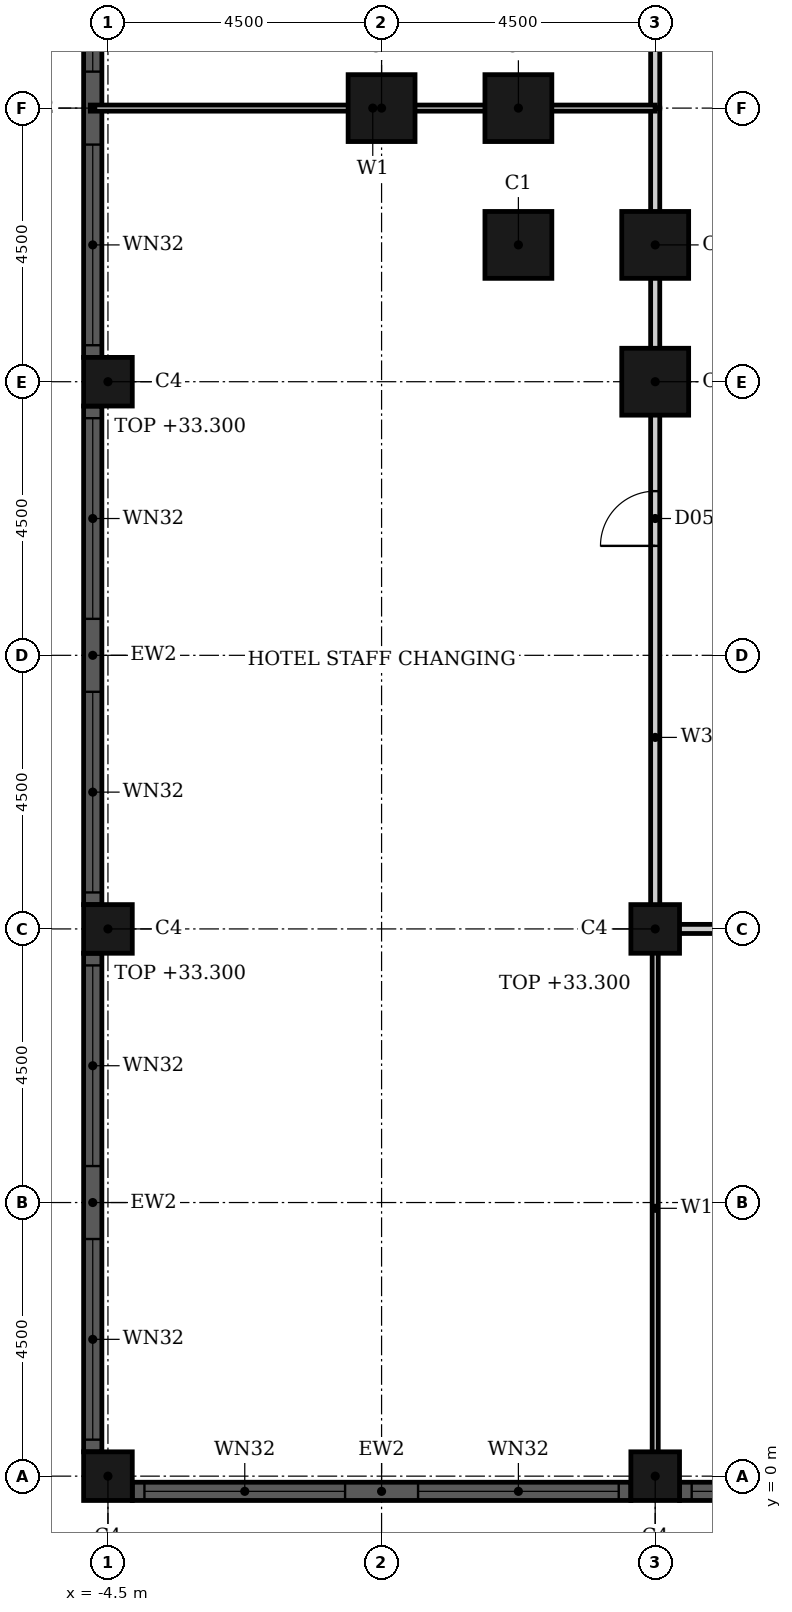
"""IFC4 building model, lengths in metres.
Left out: names, types, materials, properties, quantities, classifications, styles, units other than length and angle.
Written with IfcOpenShell. Run it as: python <this file> out.ifc"""

import sys

from ifc_helpers import new_model, si_unit, direction, frame, frame_2d, origin, origin_2d, place, context, subcontext, project, spatial, rectangle, hollow_rectangle, extrude, element, fill, save


model = new_model("IFC4")
c1 = context("Model", 3, precision=1e-05, world=origin(), true_north=direction((0.0, 1.0)))
c2 = subcontext(c1, "Body", "Model", "MODEL_VIEW")
j1 = project(units=[si_unit("LENGTHUNIT", "METRE"), si_unit("PLANEANGLEUNIT", "RADIAN")], contexts=[c1])
p1 = place(None, origin())
s1 = spatial("IfcSite", under=j1, at=p1, CompositionType="ELEMENT")
p2 = place(p1, origin())
s2 = spatial("IfcBuilding", under=s1, at=p2, CompositionType="ELEMENT")
p3 = place(p2, frame((0.0, 0.0, 28.8)))
s3 = spatial("IfcBuildingStorey", under=s2, at=p3, CompositionType="ELEMENT", Elevation=28.8)
for number, where, z_axis, x_axis in (
    (1, (0.0, 22.5, 0.0), (0.0, 0.0, 1.0), (1.0, 0.0, 0.0)),
    (2, (2.25, 22.5, 0.0), (0.0, 0.0, 1.0), (1.0, 0.0, 0.0)),
    (3, (2.25, 20.25, 0.0), (0.0, 0.0, 1.0), (1.0, 0.0, 0.0)),
    (4, (4.5, 20.25, 0.0), (0.0, 0.0, 1.0), (1.0, 0.0, 0.0)),
    (5, (4.5, 18.0, 0.0), (0.0, 0.0, 1.0), (1.0, 0.0, 0.0)),
):
    element("IfcColumn", number, at=place(p3, frame(where, z_axis=z_axis, x_axis=x_axis)), inside=s3, PredefinedType="COLUMN", context=c2, shape_type="SweptSolid", body=[
        extrude(hollow_rectangle(XDim=1.1, YDim=1.1, WallThickness=0.036, at=origin_2d()), origin(), (0.0, 0.0, 1.0), 4.8),
    ])
for number, where, z_axis, x_axis in (
    (6, (-4.5, 0.0, 0.0), (0.0, 0.0, 1.0), (1.0, 0.0, 0.0)),
    (7, (-4.5, 9.0, 0.0), (0.0, 0.0, 1.0), (1.0, 0.0, 0.0)),
    (8, (-4.5, 18.0, 0.0), (0.0, 0.0, 1.0), (1.0, 0.0, 0.0)),
    (9, (4.5, 0.0, 0.0), (0.0, 0.0, 1.0), (1.0, 0.0, 0.0)),
    (10, (4.5, 9.0, 0.0), (0.0, 0.0, 1.0), (1.0, 0.0, 0.0)),
):
    element("IfcColumn", number, at=place(p3, frame(where, z_axis=z_axis, x_axis=x_axis)), inside=s3, PredefinedType="COLUMN", context=c2, shape_type="SweptSolid", body=[
        extrude(hollow_rectangle(XDim=0.8, YDim=0.8, WallThickness=0.025, at=origin_2d()), origin(), (0.0, 0.0, 1.0), 4.5),
    ])
p4 = place(p3, frame((-4.75, 26.6, 0.0), z_axis=(0.0, 0.0, 1.0), x_axis=(0.0, -1.0, 0.0)))
e11 = element("IfcWall", 11, at=p4, inside=s3, PredefinedType="SOLIDWALL", context=c2, shape_type="SweptSolid", body=[
    extrude(rectangle(XDim=8.2, YDim=0.3, at=frame_2d((4.1, 0.0))), origin(), (0.0, 0.0, 1.0), 4.8),
])
p5 = place(p4, frame((0.2, 0.0, 0.9)))
e12 = element("IfcOpeningElement", 12, at=p5, cuts=e11, PredefinedType="OPENING", context=c2, shape_type="SweptSolid", body=[
    extrude(rectangle(XDim=3.3, YDim=2.9, at=frame_2d((1.65, 1.45))), frame((0.0, 0.16, 0.0), z_axis=(0.0, -1.0, 0.0), x_axis=(1.0, 0.0, 0.0)), (0.0, 0.0, 1.0), 0.32),
])
p6 = place(p4, frame((4.7, 0.0, 0.9)))
e13 = element("IfcOpeningElement", 13, at=p6, cuts=e11, PredefinedType="OPENING", context=c2, shape_type="SweptSolid", body=[
    extrude(rectangle(XDim=3.3, YDim=2.9, at=frame_2d((1.65, 1.45))), frame((0.0, 0.16, 0.0), z_axis=(0.0, -1.0, 0.0), x_axis=(1.0, 0.0, 0.0)), (0.0, 0.0, 1.0), 0.32),
])
p7 = place(p3, frame((-4.75, 17.6, 0.0), z_axis=(0.0, 0.0, 1.0), x_axis=(0.0, -1.0, 0.0)))
e14 = element("IfcWall", 14, at=p7, inside=s3, PredefinedType="SOLIDWALL", context=c2, shape_type="SweptSolid", body=[
    extrude(rectangle(XDim=8.2, YDim=0.3, at=frame_2d((4.1, 0.0))), origin(), (0.0, 0.0, 1.0), 4.8),
])
p8 = place(p7, frame((0.2, 0.0, 0.9)))
e15 = element("IfcOpeningElement", 15, at=p8, cuts=e14, PredefinedType="OPENING", context=c2, shape_type="SweptSolid", body=[
    extrude(rectangle(XDim=3.3, YDim=2.9, at=frame_2d((1.65, 1.45))), frame((0.0, 0.16, 0.0), z_axis=(0.0, -1.0, 0.0), x_axis=(1.0, 0.0, 0.0)), (0.0, 0.0, 1.0), 0.32),
])
p9 = place(p7, frame((4.7, 0.0, 0.9)))
e16 = element("IfcOpeningElement", 16, at=p9, cuts=e14, PredefinedType="OPENING", context=c2, shape_type="SweptSolid", body=[
    extrude(rectangle(XDim=3.3, YDim=2.9, at=frame_2d((1.65, 1.45))), frame((0.0, 0.16, 0.0), z_axis=(0.0, -1.0, 0.0), x_axis=(1.0, 0.0, 0.0)), (0.0, 0.0, 1.0), 0.32),
])
p10 = place(p3, frame((-4.75, 8.6, 0.0), z_axis=(0.0, 0.0, 1.0), x_axis=(0.0, -1.0, 0.0)))
e17 = element("IfcWall", 17, at=p10, inside=s3, PredefinedType="SOLIDWALL", context=c2, shape_type="SweptSolid", body=[
    extrude(rectangle(XDim=8.2, YDim=0.3, at=frame_2d((4.1, 0.0))), origin(), (0.0, 0.0, 1.0), 4.8),
])
p11 = place(p10, frame((0.2, 0.0, 0.9)))
e18 = element("IfcOpeningElement", 18, at=p11, cuts=e17, PredefinedType="OPENING", context=c2, shape_type="SweptSolid", body=[
    extrude(rectangle(XDim=3.3, YDim=2.9, at=frame_2d((1.65, 1.45))), frame((0.0, 0.16, 0.0), z_axis=(0.0, -1.0, 0.0), x_axis=(1.0, 0.0, 0.0)), (0.0, 0.0, 1.0), 0.32),
])
p12 = place(p10, frame((4.7, 0.0, 0.9)))
e19 = element("IfcOpeningElement", 19, at=p12, cuts=e17, PredefinedType="OPENING", context=c2, shape_type="SweptSolid", body=[
    extrude(rectangle(XDim=3.3, YDim=2.9, at=frame_2d((1.65, 1.45))), frame((0.0, 0.16, 0.0), z_axis=(0.0, -1.0, 0.0), x_axis=(1.0, 0.0, 0.0)), (0.0, 0.0, 1.0), 0.32),
])
p13 = place(p3, frame((-4.1, -0.25, 0.0), z_axis=(0.0, 0.0, 1.0), x_axis=(1.0, 0.0, 0.0)))
e20 = element("IfcWall", 20, at=p13, inside=s3, PredefinedType="SOLIDWALL", context=c2, shape_type="SweptSolid", body=[
    extrude(rectangle(XDim=8.2, YDim=0.3, at=frame_2d((4.1, 0.0))), origin(), (0.0, 0.0, 1.0), 4.8),
])
p14 = place(p13, frame((0.2, 0.0, 0.9)))
e21 = element("IfcOpeningElement", 21, at=p14, cuts=e20, PredefinedType="OPENING", context=c2, shape_type="SweptSolid", body=[
    extrude(rectangle(XDim=3.3, YDim=2.9, at=frame_2d((1.65, 1.45))), frame((0.0, 0.16, 0.0), z_axis=(0.0, -1.0, 0.0), x_axis=(1.0, 0.0, 0.0)), (0.0, 0.0, 1.0), 0.32),
])
p15 = place(p13, frame((4.7, 0.0, 0.9)))
e22 = element("IfcOpeningElement", 22, at=p15, cuts=e20, PredefinedType="OPENING", context=c2, shape_type="SweptSolid", body=[
    extrude(rectangle(XDim=3.3, YDim=2.9, at=frame_2d((1.65, 1.45))), frame((0.0, 0.16, 0.0), z_axis=(0.0, -1.0, 0.0), x_axis=(1.0, 0.0, 0.0)), (0.0, 0.0, 1.0), 0.32),
])
p16 = place(p3, frame((4.9, -0.25, 0.0), z_axis=(0.0, 0.0, 1.0), x_axis=(1.0, 0.0, 0.0)))
e23 = element("IfcWall", 23, at=p16, inside=s3, PredefinedType="SOLIDWALL", context=c2, shape_type="SweptSolid", body=[
    extrude(rectangle(XDim=8.2, YDim=0.3, at=frame_2d((4.1, 0.0))), origin(), (0.0, 0.0, 1.0), 4.8),
])
p17 = place(p16, frame((0.2, 0.0, 0.9)))
e24 = element("IfcOpeningElement", 24, at=p17, cuts=e23, PredefinedType="OPENING", context=c2, shape_type="SweptSolid", body=[
    extrude(rectangle(XDim=3.3, YDim=2.9, at=frame_2d((1.65, 1.45))), frame((0.0, 0.16, 0.0), z_axis=(0.0, -1.0, 0.0), x_axis=(1.0, 0.0, 0.0)), (0.0, 0.0, 1.0), 0.32),
])
p18 = place(p16, frame((4.7, 0.0, 0.9)))
e25 = element("IfcOpeningElement", 25, at=p18, cuts=e23, PredefinedType="OPENING", context=c2, shape_type="SweptSolid", body=[
    extrude(rectangle(XDim=3.3, YDim=2.9, at=frame_2d((1.65, 1.45))), frame((0.0, 0.16, 0.0), z_axis=(0.0, -1.0, 0.0), x_axis=(1.0, 0.0, 0.0)), (0.0, 0.0, 1.0), 0.32),
])
p19 = place(p3, frame((4.5, 9.0, 0.0), z_axis=(0.0, 0.0, 1.0), x_axis=(1.0, 0.0, 0.0)))
e26 = element("IfcWall", 26, at=p19, inside=s3, PredefinedType="PARTITIONING", context=c2, shape_type="SweptSolid", body=[
    extrude(rectangle(XDim=3.1, YDim=0.15, at=frame_2d((1.55, 0.0))), origin(), (0.0, 0.0, 1.0), 4.5),
])
p20 = place(p3, frame((4.5, 9.0, 0.0), z_axis=(0.0, 0.0, 1.0), x_axis=(0.0, 1.0, 0.0)))
e27 = element("IfcWall", 27, at=p20, inside=s3, PredefinedType="PARTITIONING", context=c2, shape_type="SweptSolid", body=[
    extrude(rectangle(XDim=13.5, YDim=0.15, at=frame_2d((6.75, 0.0))), origin(), (0.0, 0.0, 1.0), 3.88),
])
p21 = place(p20, frame((6.3, 0.0, 0.0)))
e28 = element("IfcOpeningElement", 28, at=p21, cuts=e27, PredefinedType="OPENING", context=c2, shape_type="SweptSolid", body=[
    extrude(rectangle(XDim=0.9, YDim=2.1, at=frame_2d((0.45, 1.05))), frame((0.0, 0.085, 0.0), z_axis=(0.0, -1.0, 0.0), x_axis=(1.0, 0.0, 0.0)), (0.0, 0.0, 1.0), 0.17),
])
p22 = place(p3, frame((4.5, 22.5, 0.0), z_axis=(0.0, 0.0, 1.0), x_axis=(0.0, 1.0, 0.0)))
e29 = element("IfcWall", 29, at=p22, inside=s3, PredefinedType="PARTITIONING", context=c2, shape_type="SweptSolid", body=[
    extrude(rectangle(XDim=7.0, YDim=0.15, at=frame_2d((3.5, 0.0))), origin(), (0.0, 0.0, 1.0), 4.5),
])
p23 = place(p22, frame((2.45, 0.0, 0.0)))
e30 = element("IfcOpeningElement", 30, at=p23, cuts=e29, PredefinedType="OPENING", context=c2, shape_type="SweptSolid", body=[
    extrude(rectangle(XDim=1.2, YDim=2.4, at=frame_2d((0.6, 1.2))), frame((0.0, 0.085, 0.0), z_axis=(0.0, -1.0, 0.0), x_axis=(1.0, 0.0, 0.0)), (0.0, 0.0, 1.0), 0.17),
])
p24 = place(p3, frame((-4.79, 22.5, 0.0), z_axis=(0.0, 0.0, 1.0), x_axis=(1.0, 0.0, 0.0)))
e31 = element("IfcWall", 31, at=p24, inside=s3, PredefinedType="PARTITIONING", context=c2, shape_type="SweptSolid", body=[
    extrude(rectangle(XDim=9.29, YDim=0.1, at=frame_2d((4.645, 0.0))), origin(), (0.0, 0.0, 1.0), 3.78),
])
p25 = place(p3, frame((4.5, -0.19, 0.0), z_axis=(0.0, 0.0, 1.0), x_axis=(0.0, 1.0, 0.0)))
e32 = element("IfcWall", 32, at=p25, inside=s3, PredefinedType="PARTITIONING", context=c2, shape_type="SweptSolid", body=[
    extrude(rectangle(XDim=9.19, YDim=0.1, at=frame_2d((4.595, 0.0))), origin(), (0.0, 0.0, 1.0), 4.5),
])
p26 = place(p5, origin())
e33 = element("IfcWindow", 33, at=p26, inside=s3, PartitioningType="SINGLE_PANEL", PredefinedType="WINDOW", context=c2, shape_type="SweptSolid", body=[
    extrude(rectangle(XDim=3.3, YDim=2.9, at=frame_2d((1.65, 1.45))), frame((0.0, 0.03, 0.0), z_axis=(0.0, -1.0, 0.0), x_axis=(1.0, 0.0, 0.0)), (0.0, 0.0, 1.0), 0.06),
])
fill(e12, e33)
p27 = place(p6, origin())
e34 = element("IfcWindow", 34, at=p27, inside=s3, PartitioningType="SINGLE_PANEL", PredefinedType="WINDOW", context=c2, shape_type="SweptSolid", body=[
    extrude(rectangle(XDim=3.3, YDim=2.9, at=frame_2d((1.65, 1.45))), frame((0.0, 0.03, 0.0), z_axis=(0.0, -1.0, 0.0), x_axis=(1.0, 0.0, 0.0)), (0.0, 0.0, 1.0), 0.06),
])
fill(e13, e34)
p28 = place(p8, origin())
e35 = element("IfcWindow", 35, at=p28, inside=s3, PartitioningType="SINGLE_PANEL", PredefinedType="WINDOW", context=c2, shape_type="SweptSolid", body=[
    extrude(rectangle(XDim=3.3, YDim=2.9, at=frame_2d((1.65, 1.45))), frame((0.0, 0.03, 0.0), z_axis=(0.0, -1.0, 0.0), x_axis=(1.0, 0.0, 0.0)), (0.0, 0.0, 1.0), 0.06),
])
fill(e15, e35)
p29 = place(p9, origin())
e36 = element("IfcWindow", 36, at=p29, inside=s3, PartitioningType="SINGLE_PANEL", PredefinedType="WINDOW", context=c2, shape_type="SweptSolid", body=[
    extrude(rectangle(XDim=3.3, YDim=2.9, at=frame_2d((1.65, 1.45))), frame((0.0, 0.03, 0.0), z_axis=(0.0, -1.0, 0.0), x_axis=(1.0, 0.0, 0.0)), (0.0, 0.0, 1.0), 0.06),
])
fill(e16, e36)
p30 = place(p11, origin())
e37 = element("IfcWindow", 37, at=p30, inside=s3, PartitioningType="SINGLE_PANEL", PredefinedType="WINDOW", context=c2, shape_type="SweptSolid", body=[
    extrude(rectangle(XDim=3.3, YDim=2.9, at=frame_2d((1.65, 1.45))), frame((0.0, 0.03, 0.0), z_axis=(0.0, -1.0, 0.0), x_axis=(1.0, 0.0, 0.0)), (0.0, 0.0, 1.0), 0.06),
])
fill(e18, e37)
p31 = place(p12, origin())
e38 = element("IfcWindow", 38, at=p31, inside=s3, PartitioningType="SINGLE_PANEL", PredefinedType="WINDOW", context=c2, shape_type="SweptSolid", body=[
    extrude(rectangle(XDim=3.3, YDim=2.9, at=frame_2d((1.65, 1.45))), frame((0.0, 0.03, 0.0), z_axis=(0.0, -1.0, 0.0), x_axis=(1.0, 0.0, 0.0)), (0.0, 0.0, 1.0), 0.06),
])
fill(e19, e38)
p32 = place(p14, origin())
e39 = element("IfcWindow", 39, at=p32, inside=s3, PartitioningType="SINGLE_PANEL", PredefinedType="WINDOW", context=c2, shape_type="SweptSolid", body=[
    extrude(rectangle(XDim=3.3, YDim=2.9, at=frame_2d((1.65, 1.45))), frame((0.0, 0.03, 0.0), z_axis=(0.0, -1.0, 0.0), x_axis=(1.0, 0.0, 0.0)), (0.0, 0.0, 1.0), 0.06),
])
fill(e21, e39)
p33 = place(p15, origin())
e40 = element("IfcWindow", 40, at=p33, inside=s3, PartitioningType="SINGLE_PANEL", PredefinedType="WINDOW", context=c2, shape_type="SweptSolid", body=[
    extrude(rectangle(XDim=3.3, YDim=2.9, at=frame_2d((1.65, 1.45))), frame((0.0, 0.03, 0.0), z_axis=(0.0, -1.0, 0.0), x_axis=(1.0, 0.0, 0.0)), (0.0, 0.0, 1.0), 0.06),
])
fill(e22, e40)
p34 = place(p17, origin())
e41 = element("IfcWindow", 41, at=p34, inside=s3, PartitioningType="SINGLE_PANEL", PredefinedType="WINDOW", context=c2, shape_type="SweptSolid", body=[
    extrude(rectangle(XDim=3.3, YDim=2.9, at=frame_2d((1.65, 1.45))), frame((0.0, 0.03, 0.0), z_axis=(0.0, -1.0, 0.0), x_axis=(1.0, 0.0, 0.0)), (0.0, 0.0, 1.0), 0.06),
])
fill(e24, e41)
p35 = place(p21, origin())
e42 = element("IfcDoor", 42, at=p35, inside=s3, OperationType="SINGLE_SWING_LEFT", PredefinedType="DOOR", context=c2, shape_type="SweptSolid", body=[
    extrude(rectangle(XDim=0.9, YDim=2.1, at=frame_2d((0.45, 1.05))), frame((0.0, 0.025, 0.0), z_axis=(0.0, -1.0, 0.0), x_axis=(1.0, 0.0, 0.0)), (0.0, 0.0, 1.0), 0.05),
])
fill(e28, e42)
save(model, sys.argv[1])
